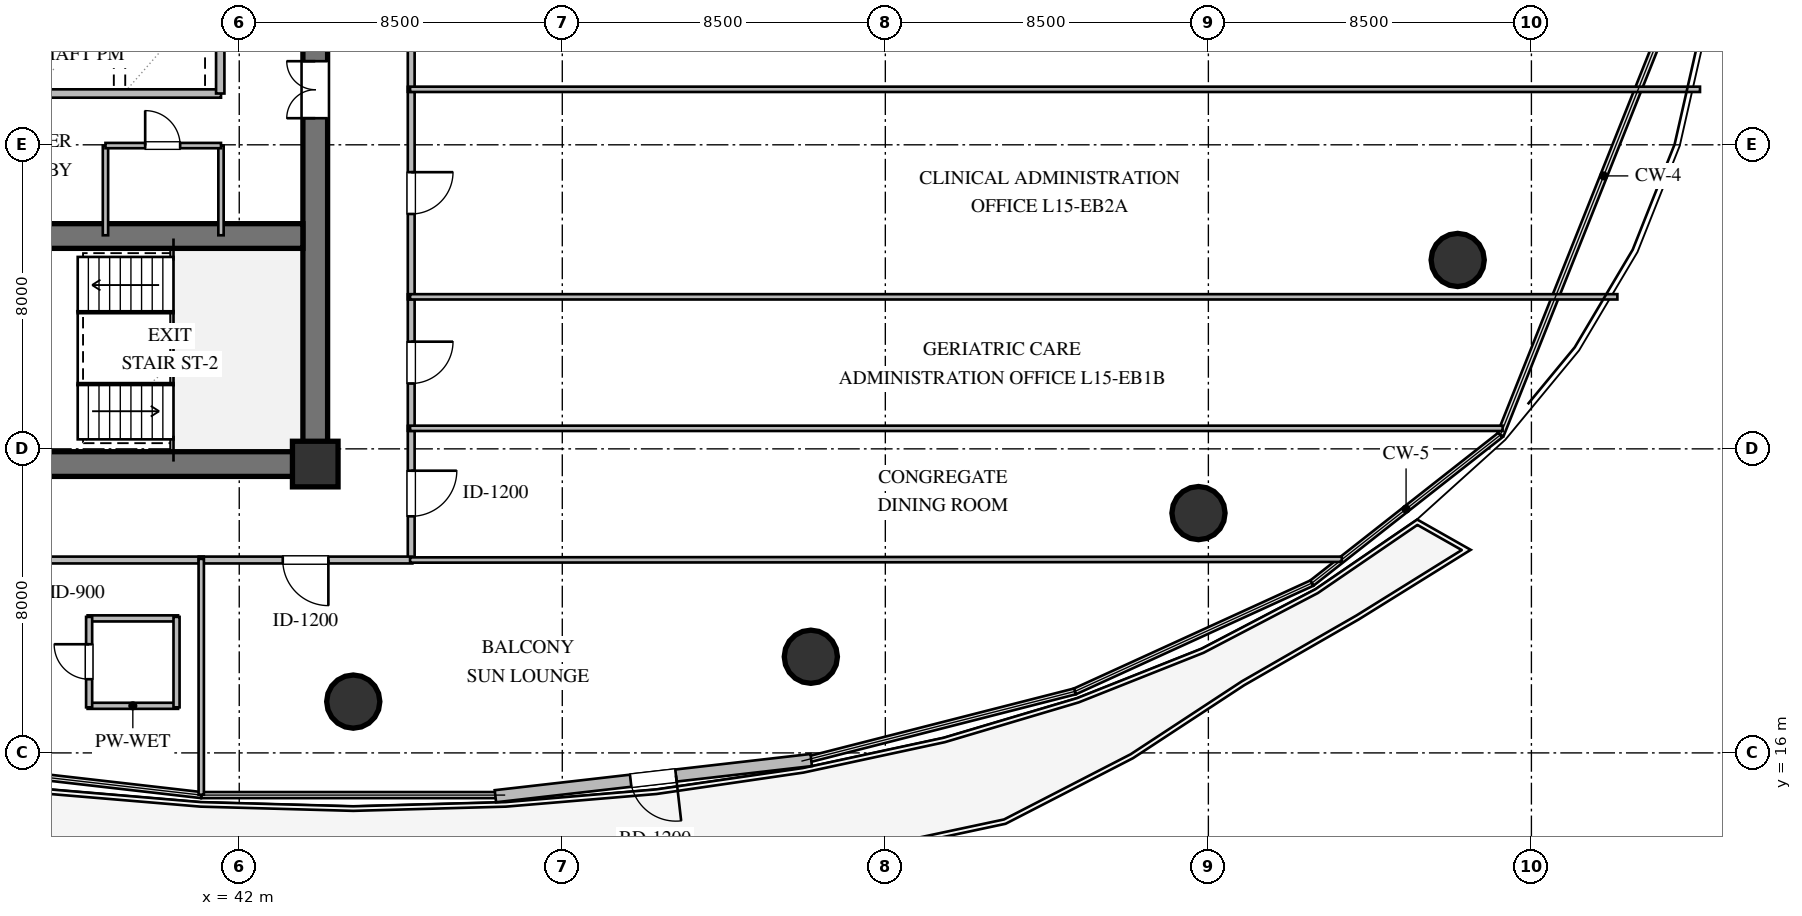
"""IFC4 building model, lengths in metres.
Left out: names, types, materials, properties, quantities, classifications, styles, units other than length and angle.
Written with IfcOpenShell. Run it as: python <this file> out.ifc"""

import sys

from ifc_helpers import new_model, si_unit, direction, frame, frame_2d, origin, origin_2d, place, context, subcontext, project, spatial, rectangle, circle, extrude, element, fill, save


model = new_model("IFC4")
c1 = context("Model", 3, precision=1e-05, world=origin(), true_north=direction((0.0, 1.0)))
c2 = subcontext(c1, "Body", "Model", "MODEL_VIEW")
j1 = project(units=[si_unit("LENGTHUNIT", "METRE"), si_unit("PLANEANGLEUNIT", "RADIAN")], contexts=[c1])
p1 = place(None, origin())
s1 = spatial("IfcSite", under=j1, at=p1, CompositionType="ELEMENT")
p2 = place(p1, origin())
s2 = spatial("IfcBuilding", under=s1, at=p2, CompositionType="ELEMENT")
p3 = place(p2, frame((0.0, 0.0, 60.0)))
s3 = spatial("IfcBuildingStorey", under=s2, at=p3, CompositionType="ELEMENT", Elevation=60.0)
p4 = place(p3, frame((21.675, 23.6, 0.0), z_axis=(0.0, 0.0, 1.0), x_axis=(1.0, 0.0, 0.0)))
e1 = element("IfcWall", 1, at=p4, inside=s3, PredefinedType="SHEAR", context=c2, shape_type="SweptSolid", body=[
    extrude(rectangle(XDim=22.65, YDim=0.65, at=frame_2d((11.325, 0.0))), origin(), (0.0, 0.0, 1.0), 3.36),
])
p5 = place(p3, frame((44.0, 23.925, 0.0), z_axis=(0.0, 0.0, 1.0), x_axis=(0.0, 1.0, 0.0)))
e2 = element("IfcWall", 2, at=p5, inside=s3, PredefinedType="SHEAR", context=c2, shape_type="SweptSolid", body=[
    extrude(rectangle(XDim=12.15, YDim=0.65, at=frame_2d((6.075, 0.0))), origin(), (0.0, 0.0, 1.0), 3.36),
])
p6 = place(p5, frame((8.775, 0.0, 0.0)))
e3 = element("IfcOpeningElement", 3, at=p6, cuts=e2, PredefinedType="OPENING", context=c2, shape_type="SweptSolid", body=[
    extrude(rectangle(XDim=1.5, YDim=2.15, at=frame_2d((0.75, 1.075))), frame((0.0, 0.335, 0.0), z_axis=(0.0, -1.0, 0.0), x_axis=(1.0, 0.0, 0.0)), (0.0, 0.0, 1.0), 0.67),
])
p7 = place(p3, frame((22.325, 29.6, 0.0), z_axis=(0.0, 0.0, 1.0), x_axis=(1.0, 0.0, 0.0)))
e4 = element("IfcWall", 4, at=p7, inside=s3, PredefinedType="SHEAR", context=c2, shape_type="SweptSolid", body=[
    extrude(rectangle(XDim=21.35, YDim=0.65, at=frame_2d((10.675, 0.0))), origin(), (0.0, 0.0, 1.0), 3.36),
])
p8 = place(p7, frame((12.125, 0.0, 0.0)))
e5 = element("IfcOpeningElement", 5, at=p8, cuts=e4, PredefinedType="OPENING", context=c2, shape_type="SweptSolid", body=[
    extrude(rectangle(XDim=1.15, YDim=2.1, at=frame_2d((0.575, 1.05))), frame((0.0, 0.335, 0.0), z_axis=(0.0, -1.0, 0.0), x_axis=(1.0, 0.0, 0.0)), (0.0, 0.0, 1.0), 0.67),
])
p9 = place(p3, frame((44.0, 23.6, 0.0), z_axis=(0.0, 0.0, 1.0), x_axis=(1.0, 0.0, 0.0)))
e6 = element("IfcColumn", 6, at=p9, inside=s3, PredefinedType="COLUMN", context=c2, shape_type="SweptSolid", body=[
    extrude(rectangle(XDim=1.2, YDim=1.2, at=origin_2d()), origin(), (0.0, 0.0, 1.0), 3.6),
])
for number, where, z_axis, x_axis in (
    (7, (45.0, 17.35, 0.0), (0.0, 0.0, 1.0), (1.0, 0.0, 0.0)),
    (8, (57.04, 18.53, 0.0), (0.0, 0.0, 1.0), (1.0, 0.0, 0.0)),
    (9, (67.24, 22.31, 0.0), (0.0, 0.0, 1.0), (1.0, 0.0, 0.0)),
    (10, (74.06, 28.97, 0.0), (0.0, 0.0, 1.0), (1.0, 0.0, 0.0)),
):
    element("IfcColumn", number, at=place(p3, frame(where, z_axis=z_axis, x_axis=x_axis)), inside=s3, PredefinedType="COLUMN", context=c2, shape_type="SweptSolid", body=[
        extrude(circle(Radius=0.7, at=origin_2d()), origin(), (0.0, 0.0, 1.0), 3.6),
    ])
p10 = place(p3, frame((57.05, 15.812, 0.0), z_axis=(0.0, 0.0, 1.0), x_axis=(-0.993503192468, -0.113804246649, 0.0)))
e11 = element("IfcWall", 11, at=p10, inside=s3, PredefinedType="STANDARD", context=c2, shape_type="SweptSolid", body=[
    extrude(rectangle(XDim=8.365, YDim=0.32, at=frame_2d((4.182, 0.0))), origin(), (0.0, 0.0, 1.0), 3.36),
])
p11 = place(p10, frame((3.582, 0.0, 0.0)))
e12 = element("IfcOpeningElement", 12, at=p11, cuts=e11, PredefinedType="OPENING", context=c2, shape_type="SweptSolid", body=[
    extrude(rectangle(XDim=1.2, YDim=2.15, at=frame_2d((0.6, 1.075))), frame((0.0, 0.17, 0.0), z_axis=(0.0, -1.0, 0.0), x_axis=(1.0, 0.0, 0.0)), (0.0, 0.0, 1.0), 0.34),
])
p12 = place(p3, frame((33.98, 33.35, 0.0), z_axis=(0.0, 0.0, 1.0), x_axis=(1.0, 0.0, 0.0)))
e13 = element("IfcWall", 13, at=p12, inside=s3, PredefinedType="SOLIDWALL", context=c2, shape_type="SweptSolid", body=[
    extrude(rectangle(XDim=7.54, YDim=0.22, at=frame_2d((3.77, 0.0))), origin(), (0.0, 0.0, 1.0), 3.36),
])
p13 = place(p3, frame((41.5, 33.35, 0.0), z_axis=(0.0, 0.0, 1.0), x_axis=(0.0, 1.0, 0.0)))
e14 = element("IfcWall", 14, at=p13, inside=s3, PredefinedType="SOLIDWALL", context=c2, shape_type="SweptSolid", body=[
    extrude(rectangle(XDim=2.75, YDim=0.22, at=frame_2d((1.375, 0.0))), origin(), (0.0, 0.0, 1.0), 3.36),
])
for number, where, z_axis, x_axis in (
    (15, (38.48, 29.62, 0.0), (0.0, 0.0, 1.0), (0.0, 1.0, 0.0)),
    (16, (41.52, 29.62, 0.0), (0.0, 0.0, 1.0), (0.0, 1.0, 0.0)),
):
    element("IfcWall", number, at=place(p3, frame(where, z_axis=z_axis, x_axis=x_axis)), inside=s3, PredefinedType="PARTITIONING", context=c2, shape_type="SweptSolid", body=[
        extrude(rectangle(XDim=2.36, YDim=0.14, at=frame_2d((1.18, 0.0))), origin(), (0.0, 0.0, 1.0), 3.36),
    ])
p14 = place(p3, frame((38.48, 31.98, 0.0), z_axis=(0.0, 0.0, 1.0), x_axis=(1.0, 0.0, 0.0)))
e17 = element("IfcWall", 17, at=p14, inside=s3, PredefinedType="PARTITIONING", context=c2, shape_type="SweptSolid", body=[
    extrude(rectangle(XDim=3.04, YDim=0.14, at=frame_2d((1.52, 0.0))), origin(), (0.0, 0.0, 1.0), 3.36),
])
p15 = place(p14, frame((1.045, 0.0, 0.0)))
e18 = element("IfcOpeningElement", 18, at=p15, cuts=e17, PredefinedType="OPENING", context=c2, shape_type="SweptSolid", body=[
    extrude(rectangle(XDim=0.92, YDim=2.1, at=frame_2d((0.46, 1.05))), frame((0.0, 0.08, 0.0), z_axis=(0.0, -1.0, 0.0), x_axis=(1.0, 0.0, 0.0)), (0.0, 0.0, 1.0), 0.16),
])
p16 = place(p3, frame((38.01, 17.239, 0.0), z_axis=(0.0, 0.0, 1.0), x_axis=(1.0, 0.0, 0.0)))
e19 = element("IfcWall", 19, at=p16, inside=s3, PredefinedType="PLUMBINGWALL", context=c2, shape_type="SweptSolid", body=[
    extrude(rectangle(XDim=2.38, YDim=0.16, at=frame_2d((1.19, 0.0))), origin(), (0.0, 0.0, 1.0), 2.738),
])
p17 = place(p3, frame((38.01, 19.539, 0.0), z_axis=(0.0, 0.0, 1.0), x_axis=(1.0, 0.0, 0.0)))
e20 = element("IfcWall", 20, at=p17, inside=s3, PredefinedType="PLUMBINGWALL", context=c2, shape_type="SweptSolid", body=[
    extrude(rectangle(XDim=2.38, YDim=0.16, at=frame_2d((1.19, 0.0))), origin(), (0.0, 0.0, 1.0), 3.36),
])
p18 = place(p3, frame((38.05, 17.199, 0.0), z_axis=(0.0, 0.0, 1.0), x_axis=(0.0, 1.0, 0.0)))
e21 = element("IfcWall", 21, at=p18, inside=s3, PredefinedType="PLUMBINGWALL", context=c2, shape_type="SweptSolid", body=[
    extrude(rectangle(XDim=2.38, YDim=0.16, at=frame_2d((1.19, 0.0))), origin(), (0.0, 0.0, 1.0), 3.36),
])
p19 = place(p18, frame((0.74, 0.0, 0.0)))
e22 = element("IfcOpeningElement", 22, at=p19, cuts=e21, PredefinedType="OPENING", context=c2, shape_type="SweptSolid", body=[
    extrude(rectangle(XDim=0.92, YDim=2.1, at=frame_2d((0.46, 1.05))), frame((0.0, 0.09, 0.0), z_axis=(0.0, -1.0, 0.0), x_axis=(1.0, 0.0, 0.0)), (0.0, 0.0, 1.0), 0.18),
])
p20 = place(p3, frame((40.35, 17.199, 0.0), z_axis=(0.0, 0.0, 1.0), x_axis=(0.0, 1.0, 0.0)))
e23 = element("IfcWall", 23, at=p20, inside=s3, PredefinedType="PLUMBINGWALL", context=c2, shape_type="SweptSolid", body=[
    extrude(rectangle(XDim=2.38, YDim=0.16, at=frame_2d((1.19, 0.0))), origin(), (0.0, 0.0, 1.0), 3.36),
])
p21 = place(p3, frame((46.525, 24.605, 0.0), z_axis=(0.0, 0.0, 1.0), x_axis=(0.0, -1.0, 0.0)))
e24 = element("IfcWall", 24, at=p21, inside=s3, PredefinedType="PARTITIONING", context=c2, shape_type="SweptSolid", body=[
    extrude(rectangle(XDim=3.56, YDim=0.18, at=frame_2d((1.78, 0.0))), origin(), (0.0, 0.0, 1.0), 3.36),
])
p22 = place(p21, frame((1.18, 0.0, 0.0)))
e25 = element("IfcOpeningElement", 25, at=p22, cuts=e24, PredefinedType="OPENING", context=c2, shape_type="SweptSolid", body=[
    extrude(rectangle(XDim=1.2, YDim=2.15, at=frame_2d((0.6, 1.075))), frame((0.0, 0.1, 0.0), z_axis=(0.0, -1.0, 0.0), x_axis=(1.0, 0.0, 0.0)), (0.0, 0.0, 1.0), 0.2),
])
p23 = place(p3, frame((46.525, 28.065, 0.0), z_axis=(0.0, 0.0, 1.0), x_axis=(0.0, -1.0, 0.0)))
e26 = element("IfcWall", 26, at=p23, inside=s3, PredefinedType="PARTITIONING", context=c2, shape_type="SweptSolid", body=[
    extrude(rectangle(XDim=3.59, YDim=0.18, at=frame_2d((1.795, 0.0))), origin(), (0.0, 0.0, 1.0), 3.36),
])
p24 = place(p23, frame((1.245, 0.0, 0.0)))
e27 = element("IfcOpeningElement", 27, at=p24, cuts=e26, PredefinedType="OPENING", context=c2, shape_type="SweptSolid", body=[
    extrude(rectangle(XDim=1.1, YDim=2.1, at=frame_2d((0.55, 1.05))), frame((0.0, 0.1, 0.0), z_axis=(0.0, -1.0, 0.0), x_axis=(1.0, 0.0, 0.0)), (0.0, 0.0, 1.0), 0.2),
])
p25 = place(p3, frame((46.525, 33.525, 0.0), z_axis=(0.0, 0.0, 1.0), x_axis=(0.0, -1.0, 0.0)))
e28 = element("IfcWall", 28, at=p25, inside=s3, PredefinedType="PARTITIONING", context=c2, shape_type="SweptSolid", body=[
    extrude(rectangle(XDim=5.59, YDim=0.18, at=frame_2d((2.795, 0.0))), origin(), (0.0, 0.0, 1.0), 3.36),
])
p26 = place(p25, frame((2.245, 0.0, 0.0)))
e29 = element("IfcOpeningElement", 29, at=p26, cuts=e28, PredefinedType="OPENING", context=c2, shape_type="SweptSolid", body=[
    extrude(rectangle(XDim=1.1, YDim=2.1, at=frame_2d((0.55, 1.05))), frame((0.0, 0.1, 0.0), z_axis=(0.0, -1.0, 0.0), x_axis=(1.0, 0.0, 0.0)), (0.0, 0.0, 1.0), 0.2),
])
p27 = place(p3, frame((46.525, 38.955, 0.0), z_axis=(0.0, 0.0, 1.0), x_axis=(0.0, -1.0, 0.0)))
e30 = element("IfcWall", 30, at=p27, inside=s3, PredefinedType="PARTITIONING", context=c2, shape_type="SweptSolid", body=[
    extrude(rectangle(XDim=5.56, YDim=0.18, at=frame_2d((2.78, 0.0))), origin(), (0.0, 0.0, 1.0), 3.36),
])
p28 = place(p27, frame((2.23, 0.0, 0.0)))
e31 = element("IfcOpeningElement", 31, at=p28, cuts=e30, PredefinedType="OPENING", context=c2, shape_type="SweptSolid", body=[
    extrude(rectangle(XDim=1.1, YDim=2.1, at=frame_2d((0.55, 1.05))), frame((0.0, 0.1, 0.0), z_axis=(0.0, -1.0, 0.0), x_axis=(1.0, 0.0, 0.0)), (0.0, 0.0, 1.0), 0.2),
])
p29 = place(p3, frame((41.065, 21.075, 0.0), z_axis=(0.0, 0.0, 1.0), x_axis=(-1.0, 0.0, 0.0)))
e32 = element("IfcWall", 32, at=p29, inside=s3, PredefinedType="PARTITIONING", context=c2, shape_type="SweptSolid", body=[
    extrude(rectangle(XDim=13.13, YDim=0.18, at=frame_2d((6.565, 0.0))), origin(), (0.0, 0.0, 1.0), 2.996),
])
p30 = place(p29, frame((6.015, 0.0, 0.0)))
e33 = element("IfcOpeningElement", 33, at=p30, cuts=e32, PredefinedType="OPENING", context=c2, shape_type="SweptSolid", body=[
    extrude(rectangle(XDim=1.1, YDim=2.1, at=frame_2d((0.55, 1.05))), frame((0.0, 0.1, 0.0), z_axis=(0.0, -1.0, 0.0), x_axis=(1.0, 0.0, 0.0)), (0.0, 0.0, 1.0), 0.2),
])
p31 = place(p3, frame((46.555, 21.075, 0.0), z_axis=(0.0, 0.0, 1.0), x_axis=(-1.0, 0.0, 0.0)))
e34 = element("IfcWall", 34, at=p31, inside=s3, PredefinedType="PARTITIONING", context=c2, shape_type="SweptSolid", body=[
    extrude(rectangle(XDim=5.62, YDim=0.18, at=frame_2d((2.81, 0.0))), origin(), (0.0, 0.0, 1.0), 3.36),
])
p32 = place(p31, frame((2.21, 0.0, 0.0)))
e35 = element("IfcOpeningElement", 35, at=p32, cuts=e34, PredefinedType="OPENING", context=c2, shape_type="SweptSolid", body=[
    extrude(rectangle(XDim=1.2, YDim=2.15, at=frame_2d((0.6, 1.075))), frame((0.0, 0.1, 0.0), z_axis=(0.0, -1.0, 0.0), x_axis=(1.0, 0.0, 0.0)), (0.0, 0.0, 1.0), 0.2),
])
p33 = place(p3, frame((46.495, 24.54, 0.0), z_axis=(0.0, 0.0, 1.0), x_axis=(1.0, 0.0, 0.0)))
e36 = element("IfcWall", 36, at=p33, inside=s3, PredefinedType="PARTITIONING", context=c2, shape_type="SweptSolid", body=[
    extrude(rectangle(XDim=28.747, YDim=0.14, at=frame_2d((14.374, 0.0))), origin(), (0.0, 0.0, 1.0), 2.89),
])
p34 = place(p3, frame((71.011, 21.094, 0.0), z_axis=(0.0, 0.0, 1.0), x_axis=(-0.999999682646, -0.000796685534, 0.0)))
e37 = element("IfcWall", 37, at=p34, inside=s3, PredefinedType="PARTITIONING", context=c2, shape_type="SweptSolid", body=[
    extrude(rectangle(XDim=24.516, YDim=0.14, at=frame_2d((12.258, 0.0))), origin(), (0.0, 0.0, 1.0), 2.996),
])
p35 = place(p3, frame((46.495, 28.0, 0.0), z_axis=(0.0, 0.0, 1.0), x_axis=(1.0, 0.0, 0.0)))
e38 = element("IfcWall", 38, at=p35, inside=s3, PredefinedType="PARTITIONING", context=c2, shape_type="SweptSolid", body=[
    extrude(rectangle(XDim=31.767, YDim=0.14, at=frame_2d((15.883, 0.0))), origin(), (0.0, 0.0, 1.0), 2.89),
])
p36 = place(p3, frame((46.495, 33.46, 0.0), z_axis=(0.0, 0.0, 1.0), x_axis=(1.0, 0.0, 0.0)))
e39 = element("IfcWall", 39, at=p36, inside=s3, PredefinedType="PARTITIONING", context=c2, shape_type="SweptSolid", body=[
    extrude(rectangle(XDim=33.941, YDim=0.14, at=frame_2d((16.97, 0.0))), origin(), (0.0, 0.0, 1.0), 3.36),
])
p37 = place(p3, frame((41.0, 21.105, 0.0), z_axis=(0.0, 0.0, 1.0), x_axis=(0.0, -1.0, 0.0)))
e40 = element("IfcWall", 40, at=p37, inside=s3, PredefinedType="PARTITIONING", context=c2, shape_type="SweptSolid", body=[
    extrude(rectangle(XDim=6.205, YDim=0.14, at=frame_2d((3.103, 0.0))), origin(), (0.0, 0.0, 1.0), 3.36),
])
p38 = place(p11, origin())
e41 = element("IfcDoor", 41, at=p38, inside=s3, OperationType="SINGLE_SWING_LEFT", PredefinedType="DOOR", context=c2, shape_type="SweptSolid", body=[
    extrude(rectangle(XDim=1.2, YDim=2.15, at=frame_2d((0.6, 1.075))), frame((0.0, 0.025, 0.0), z_axis=(0.0, -1.0, 0.0), x_axis=(1.0, 0.0, 0.0)), (0.0, 0.0, 1.0), 0.05),
])
fill(e12, e41)
p39 = place(p6, origin())
e42 = element("IfcDoor", 42, at=p39, inside=s3, OperationType="DOUBLE_DOOR_SINGLE_SWING", PredefinedType="DOOR", context=c2, shape_type="SweptSolid", body=[
    extrude(rectangle(XDim=1.5, YDim=2.15, at=frame_2d((0.75, 1.075))), frame((0.0, 0.025, 0.0), z_axis=(0.0, -1.0, 0.0), x_axis=(1.0, 0.0, 0.0)), (0.0, 0.0, 1.0), 0.05),
])
fill(e3, e42)
p40 = place(p15, origin())
e43 = element("IfcDoor", 43, at=p40, inside=s3, OperationType="SINGLE_SWING_LEFT", PredefinedType="DOOR", context=c2, shape_type="SweptSolid", body=[
    extrude(rectangle(XDim=0.92, YDim=2.1, at=frame_2d((0.46, 1.05))), frame((0.0, 0.025, 0.0), z_axis=(0.0, -1.0, 0.0), x_axis=(1.0, 0.0, 0.0)), (0.0, 0.0, 1.0), 0.05),
])
fill(e18, e43)
p41 = place(p19, origin())
e44 = element("IfcDoor", 44, at=p41, inside=s3, OperationType="SINGLE_SWING_RIGHT", PredefinedType="DOOR", context=c2, shape_type="SweptSolid", body=[
    extrude(rectangle(XDim=0.92, YDim=2.1, at=frame_2d((0.46, 1.05))), frame((0.0, 0.025, 0.0), z_axis=(0.0, -1.0, 0.0), x_axis=(1.0, 0.0, 0.0)), (0.0, 0.0, 1.0), 0.05),
])
fill(e22, e44)
p42 = place(p22, origin())
e45 = element("IfcDoor", 45, at=p42, inside=s3, OperationType="SINGLE_SWING_LEFT", PredefinedType="DOOR", context=c2, shape_type="SweptSolid", body=[
    extrude(rectangle(XDim=1.2, YDim=2.15, at=frame_2d((0.6, 1.075))), frame((0.0, 0.025, 0.0), z_axis=(0.0, -1.0, 0.0), x_axis=(1.0, 0.0, 0.0)), (0.0, 0.0, 1.0), 0.05),
])
fill(e25, e45)
p43 = place(p24, origin())
e46 = element("IfcDoor", 46, at=p43, inside=s3, OperationType="SINGLE_SWING_LEFT", PredefinedType="DOOR", context=c2, shape_type="SweptSolid", body=[
    extrude(rectangle(XDim=1.1, YDim=2.1, at=frame_2d((0.55, 1.05))), frame((0.0, 0.025, 0.0), z_axis=(0.0, -1.0, 0.0), x_axis=(1.0, 0.0, 0.0)), (0.0, 0.0, 1.0), 0.05),
])
fill(e27, e46)
p44 = place(p26, origin())
e47 = element("IfcDoor", 47, at=p44, inside=s3, OperationType="SINGLE_SWING_LEFT", PredefinedType="DOOR", context=c2, shape_type="SweptSolid", body=[
    extrude(rectangle(XDim=1.1, YDim=2.1, at=frame_2d((0.55, 1.05))), frame((0.0, 0.025, 0.0), z_axis=(0.0, -1.0, 0.0), x_axis=(1.0, 0.0, 0.0)), (0.0, 0.0, 1.0), 0.05),
])
fill(e29, e47)
p45 = place(p32, origin())
e48 = element("IfcDoor", 48, at=p45, inside=s3, OperationType="SINGLE_SWING_LEFT", PredefinedType="DOOR", context=c2, shape_type="SweptSolid", body=[
    extrude(rectangle(XDim=1.2, YDim=2.15, at=frame_2d((0.6, 1.075))), frame((0.0, 0.025, 0.0), z_axis=(0.0, -1.0, 0.0), x_axis=(1.0, 0.0, 0.0)), (0.0, 0.0, 1.0), 0.05),
])
fill(e35, e48)
save(model, sys.argv[1])
